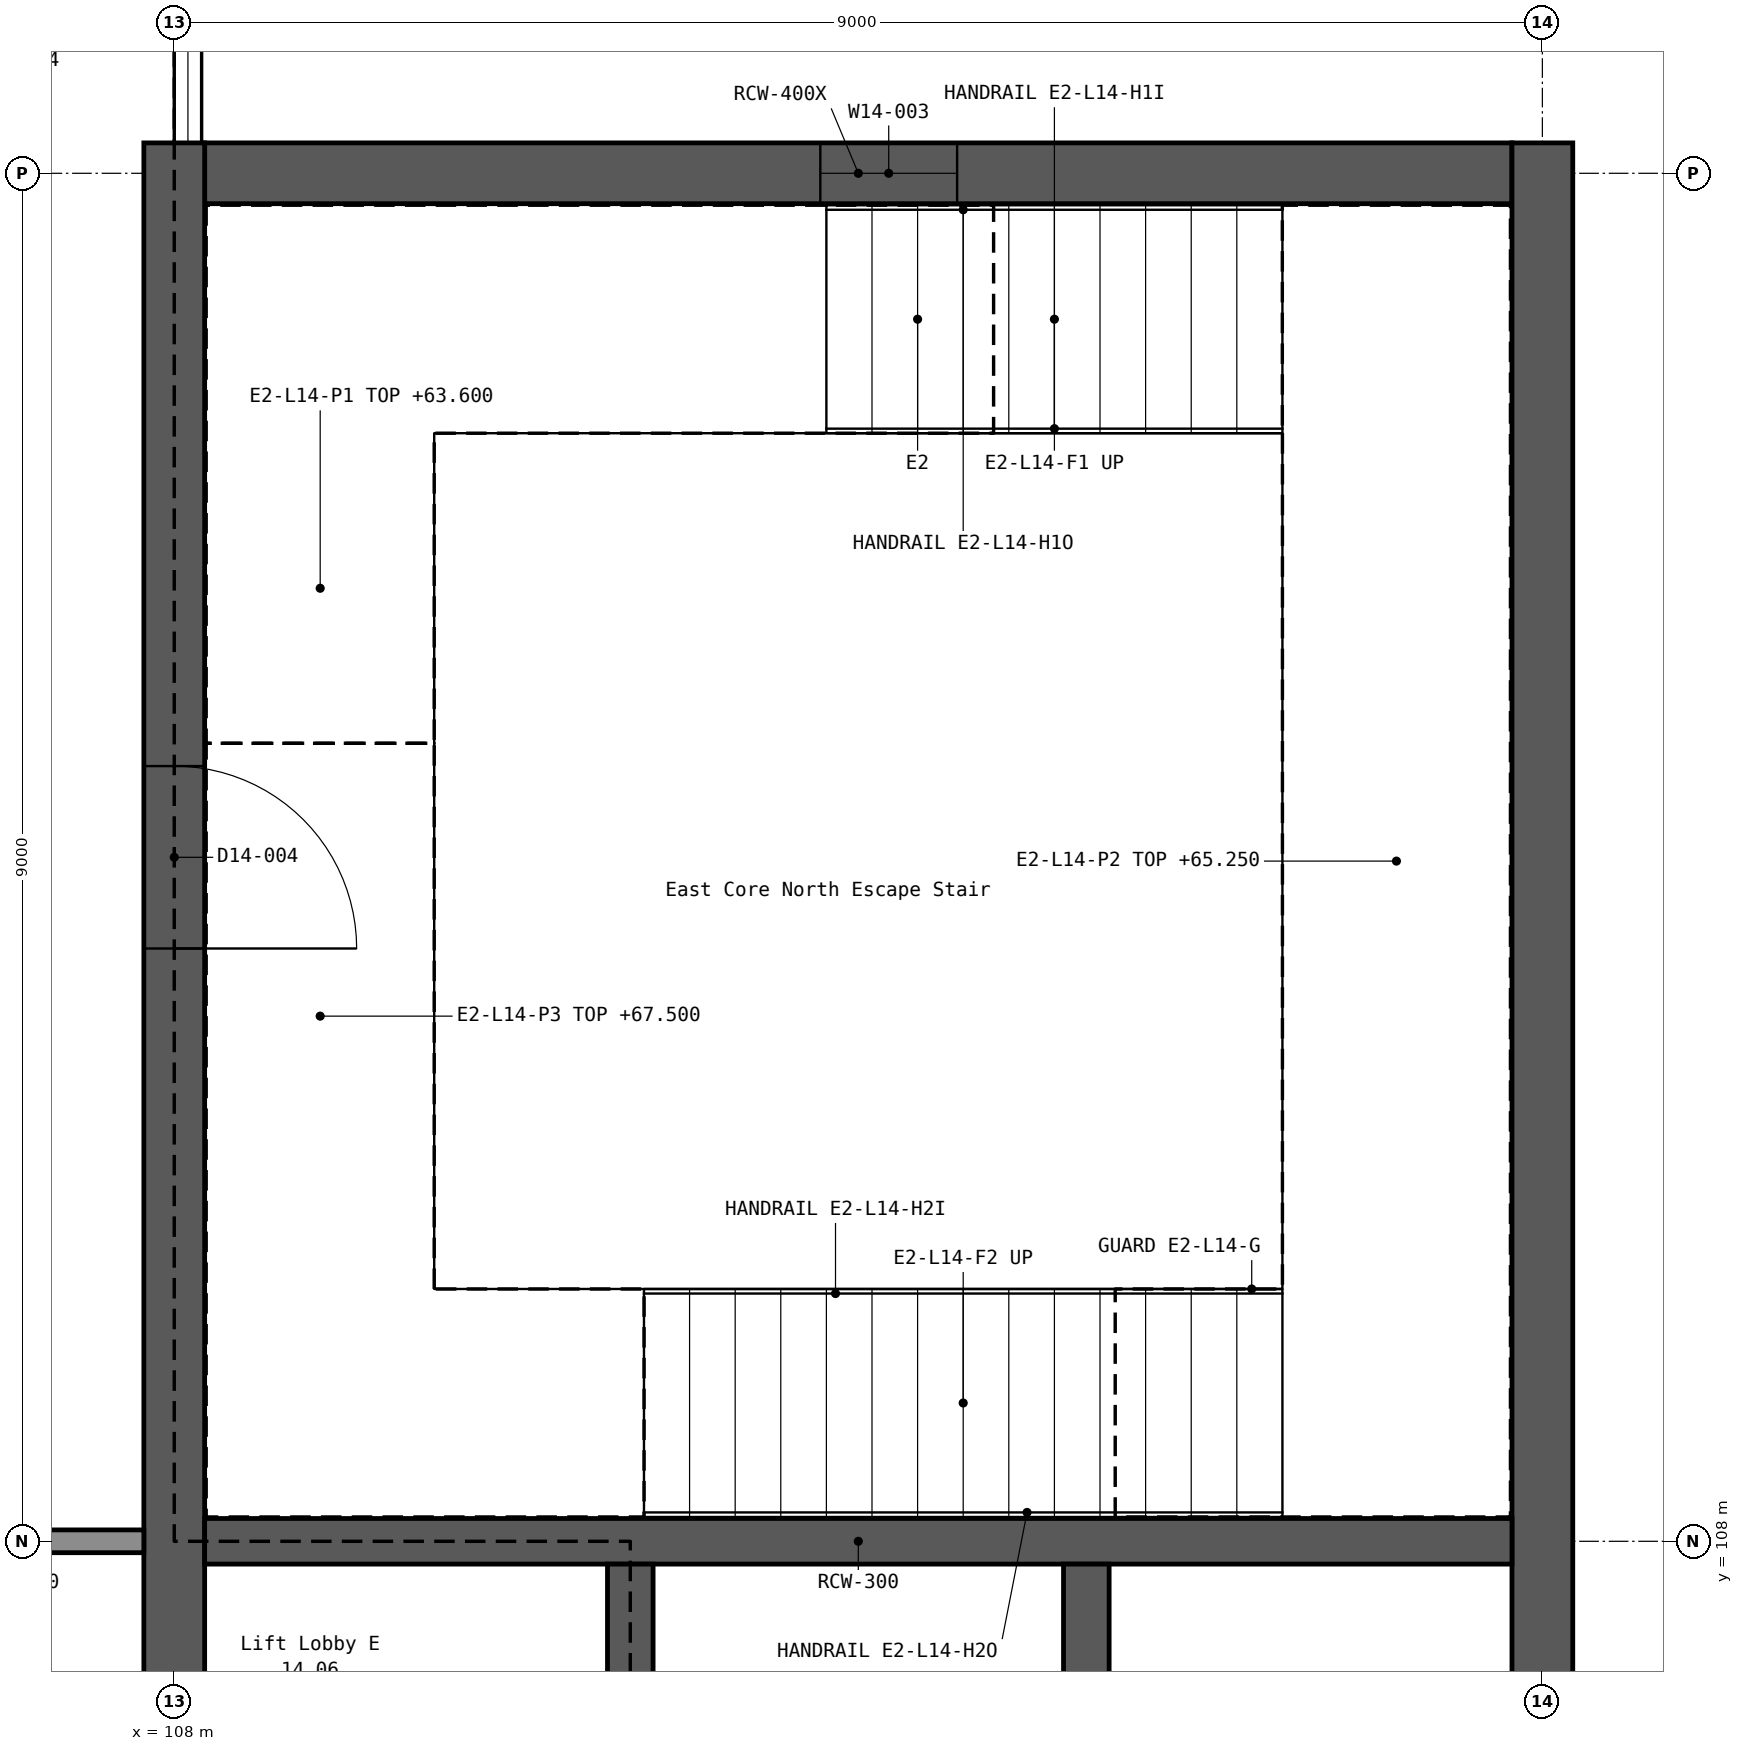
"""IFC4 building model, lengths in metres.
Left out: names, types, materials, properties, quantities, classifications, styles, units other than length and angle.
Written with IfcOpenShell. Run it as: python <this file> out.ifc"""

import sys

from ifc_helpers import new_model, si_unit, direction, frame, frame_2d, origin, place, context, subcontext, project, spatial, rectangle, extrude, element, fill, save


model = new_model("IFC4")
c1 = context("Model", 3, precision=1e-05, world=origin(), true_north=direction((0.0, 1.0)))
c2 = subcontext(c1, "Body", "Model", "MODEL_VIEW")
j1 = project(units=[si_unit("LENGTHUNIT", "METRE"), si_unit("PLANEANGLEUNIT", "RADIAN")], contexts=[c1])
p1 = place(None, origin())
s1 = spatial("IfcSite", under=j1, at=p1, CompositionType="ELEMENT")
p2 = place(p1, origin())
s2 = spatial("IfcBuilding", under=s1, at=p2, CompositionType="ELEMENT")
p3 = place(p2, frame((0.0, 0.0, 63.6)))
s3 = spatial("IfcBuildingStorey", under=s2, at=p3, CompositionType="ELEMENT", Elevation=63.6)
p4 = place(p3, frame((108.2, 117.0, 0.0), z_axis=(0.0, 0.0, 1.0), x_axis=(1.0, 0.0, 0.0)))
e1 = element("IfcWall", 1, at=p4, inside=s3, PredefinedType="SHEAR", context=c2, shape_type="SweptSolid", body=[
    extrude(rectangle(XDim=8.6, YDim=0.4, at=frame_2d((4.3, 0.0))), origin(), (0.0, 0.0, 1.0), 3.9),
])
p5 = place(p4, frame((4.05, 0.0, 1.2)))
e2 = element("IfcOpeningElement", 2, at=p5, cuts=e1, PredefinedType="OPENING", context=c2, shape_type="SweptSolid", body=[
    extrude(rectangle(XDim=0.9, YDim=1.5, at=frame_2d((0.45, 0.75))), frame((0.0, 0.211, 0.0), z_axis=(0.0, -1.0, 0.0), x_axis=(1.0, 0.0, 0.0)), (0.0, 0.0, 1.0), 0.422),
])
p6 = place(p3, frame((108.0, 89.8, 0.0), z_axis=(0.0, 0.0, 1.0), x_axis=(0.0, 1.0, 0.0)))
e3 = element("IfcWall", 3, at=p6, inside=s3, PredefinedType="SHEAR", context=c2, shape_type="SweptSolid", body=[
    extrude(rectangle(XDim=27.4, YDim=0.4, at=frame_2d((13.7, 0.0))), origin(), (0.0, 0.0, 1.0), 3.9),
])
p7 = place(p6, frame((4.1, 0.0, 0.0)))
e4 = element("IfcOpeningElement", 4, at=p7, cuts=e3, PredefinedType="OPENING", context=c2, shape_type="SweptSolid", body=[
    extrude(rectangle(XDim=1.2, YDim=2.1, at=frame_2d((0.6, 1.05))), frame((0.0, 0.211, 0.0), z_axis=(0.0, -1.0, 0.0), x_axis=(1.0, 0.0, 0.0)), (0.0, 0.0, 1.0), 0.422),
])
p8 = place(p6, frame((22.1, 0.0, 0.0)))
e5 = element("IfcOpeningElement", 5, at=p8, cuts=e3, PredefinedType="OPENING", context=c2, shape_type="SweptSolid", body=[
    extrude(rectangle(XDim=1.2, YDim=2.1, at=frame_2d((0.6, 1.05))), frame((0.0, 0.211, 0.0), z_axis=(0.0, -1.0, 0.0), x_axis=(1.0, 0.0, 0.0)), (0.0, 0.0, 1.0), 0.422),
])
p9 = place(p6, frame((12.5, 0.0, 0.0)))
e6 = element("IfcOpeningElement", 6, at=p9, cuts=e3, PredefinedType="OPENING", context=c2, shape_type="SweptSolid", body=[
    extrude(rectangle(XDim=2.0, YDim=2.1, at=frame_2d((1.0, 1.05))), frame((0.0, 0.211, 0.0), z_axis=(0.0, -1.0, 0.0), x_axis=(1.0, 0.0, 0.0)), (0.0, 0.0, 1.0), 0.422),
])
p10 = place(p3, frame((117.0, 89.8, 0.0), z_axis=(0.0, 0.0, 1.0), x_axis=(0.0, 1.0, 0.0)))
e7 = element("IfcWall", 7, at=p10, inside=s3, PredefinedType="SHEAR", context=c2, shape_type="SweptSolid", body=[
    extrude(rectangle(XDim=27.4, YDim=0.4, at=frame_2d((13.7, 0.0))), origin(), (0.0, 0.0, 1.0), 3.9),
])
p11 = place(p3, frame((108.2, 108.0, 0.0), z_axis=(0.0, 0.0, 1.0), x_axis=(1.0, 0.0, 0.0)))
e8 = element("IfcWall", 8, at=p11, inside=s3, PredefinedType="SHEAR", context=c2, shape_type="SweptSolid", body=[
    extrude(rectangle(XDim=8.6, YDim=0.3, at=frame_2d((4.3, 0.0))), origin(), (0.0, 0.0, 1.0), 3.9),
])
p12 = place(p3, frame((111.0, 99.15, 0.0), z_axis=(0.0, 0.0, 1.0), x_axis=(0.0, 1.0, 0.0)))
e9 = element("IfcWall", 9, at=p12, inside=s3, PredefinedType="SHEAR", context=c2, shape_type="SweptSolid", body=[
    extrude(rectangle(XDim=8.7, YDim=0.3, at=frame_2d((4.35, 0.0))), origin(), (0.0, 0.0, 1.0), 3.9),
])
p13 = place(p12, frame((0.8, 0.0, 0.0)))
e10 = element("IfcOpeningElement", 10, at=p13, cuts=e9, PredefinedType="OPENING", context=c2, shape_type="SweptSolid", body=[
    extrude(rectangle(XDim=1.1, YDim=2.1, at=frame_2d((0.55, 1.05))), frame((0.0, 0.161, 0.0), z_axis=(0.0, -1.0, 0.0), x_axis=(1.0, 0.0, 0.0)), (0.0, 0.0, 1.0), 0.322),
])
p14 = place(p12, frame((3.8, 0.0, 0.0)))
e11 = element("IfcOpeningElement", 11, at=p14, cuts=e9, PredefinedType="OPENING", context=c2, shape_type="SweptSolid", body=[
    extrude(rectangle(XDim=1.1, YDim=2.1, at=frame_2d((0.55, 1.05))), frame((0.0, 0.161, 0.0), z_axis=(0.0, -1.0, 0.0), x_axis=(1.0, 0.0, 0.0)), (0.0, 0.0, 1.0), 0.322),
])
p15 = place(p12, frame((6.8, 0.0, 0.0)))
e12 = element("IfcOpeningElement", 12, at=p15, cuts=e9, PredefinedType="OPENING", context=c2, shape_type="SweptSolid", body=[
    extrude(rectangle(XDim=1.1, YDim=2.1, at=frame_2d((0.55, 1.05))), frame((0.0, 0.161, 0.0), z_axis=(0.0, -1.0, 0.0), x_axis=(1.0, 0.0, 0.0)), (0.0, 0.0, 1.0), 0.322),
])
p16 = place(p3, frame((114.0, 99.15, 0.0), z_axis=(0.0, 0.0, 1.0), x_axis=(0.0, 1.0, 0.0)))
e13 = element("IfcWall", 13, at=p16, inside=s3, PredefinedType="SHEAR", context=c2, shape_type="SweptSolid", body=[
    extrude(rectangle(XDim=8.7, YDim=0.3, at=frame_2d((4.35, 0.0))), origin(), (0.0, 0.0, 1.0), 3.9),
])
p17 = place(p3, frame((105.0, 108.0, 0.0), z_axis=(0.0, 0.0, 1.0), x_axis=(1.0, 0.0, 0.0)))
e14 = element("IfcWall", 14, at=p17, inside=s3, PredefinedType="PARTITIONING", context=c2, shape_type="SweptSolid", body=[
    extrude(rectangle(XDim=2.8, YDim=0.15, at=frame_2d((1.4, 0.0))), origin(), (0.0, 0.0, 1.0), 3.27),
])
p18 = place(p17, frame((0.9, 0.0, 0.0)))
e15 = element("IfcOpeningElement", 15, at=p18, cuts=e14, PredefinedType="OPENING", context=c2, shape_type="SweptSolid", body=[
    extrude(rectangle(XDim=1.2, YDim=2.1, at=frame_2d((0.6, 1.05))), frame((0.0, 0.086, 0.0), z_axis=(0.0, -1.0, 0.0), x_axis=(1.0, 0.0, 0.0)), (0.0, 0.0, 1.0), 0.172),
])
p19 = place(p5, origin())
e16 = element("IfcWindow", 16, at=p19, inside=s3, PartitioningType="SINGLE_PANEL", PredefinedType="WINDOW", context=c2, shape_type="SweptSolid", body=[
    extrude(rectangle(XDim=0.9, YDim=1.5, at=frame_2d((0.45, 0.75))), frame((0.0, 0.03, 0.0), z_axis=(0.0, -1.0, 0.0), x_axis=(1.0, 0.0, 0.0)), (0.0, 0.0, 1.0), 0.06),
])
fill(e2, e16)
p20 = place(p8, frame((1.2, 0.0, 0.0), z_axis=(0.0, 0.0, 1.0), x_axis=(-1.0, 0.0, 0.0)))
e17 = element("IfcDoor", 17, at=p20, inside=s3, OperationType="SINGLE_SWING_RIGHT", PredefinedType="DOOR", context=c2, shape_type="SweptSolid", body=[
    extrude(rectangle(XDim=1.2, YDim=2.1, at=frame_2d((0.6, 1.05))), frame((0.0, 0.025, 0.0), z_axis=(0.0, -1.0, 0.0), x_axis=(1.0, 0.0, 0.0)), (0.0, 0.0, 1.0), 0.05),
])
fill(e5, e17)
save(model, sys.argv[1])
